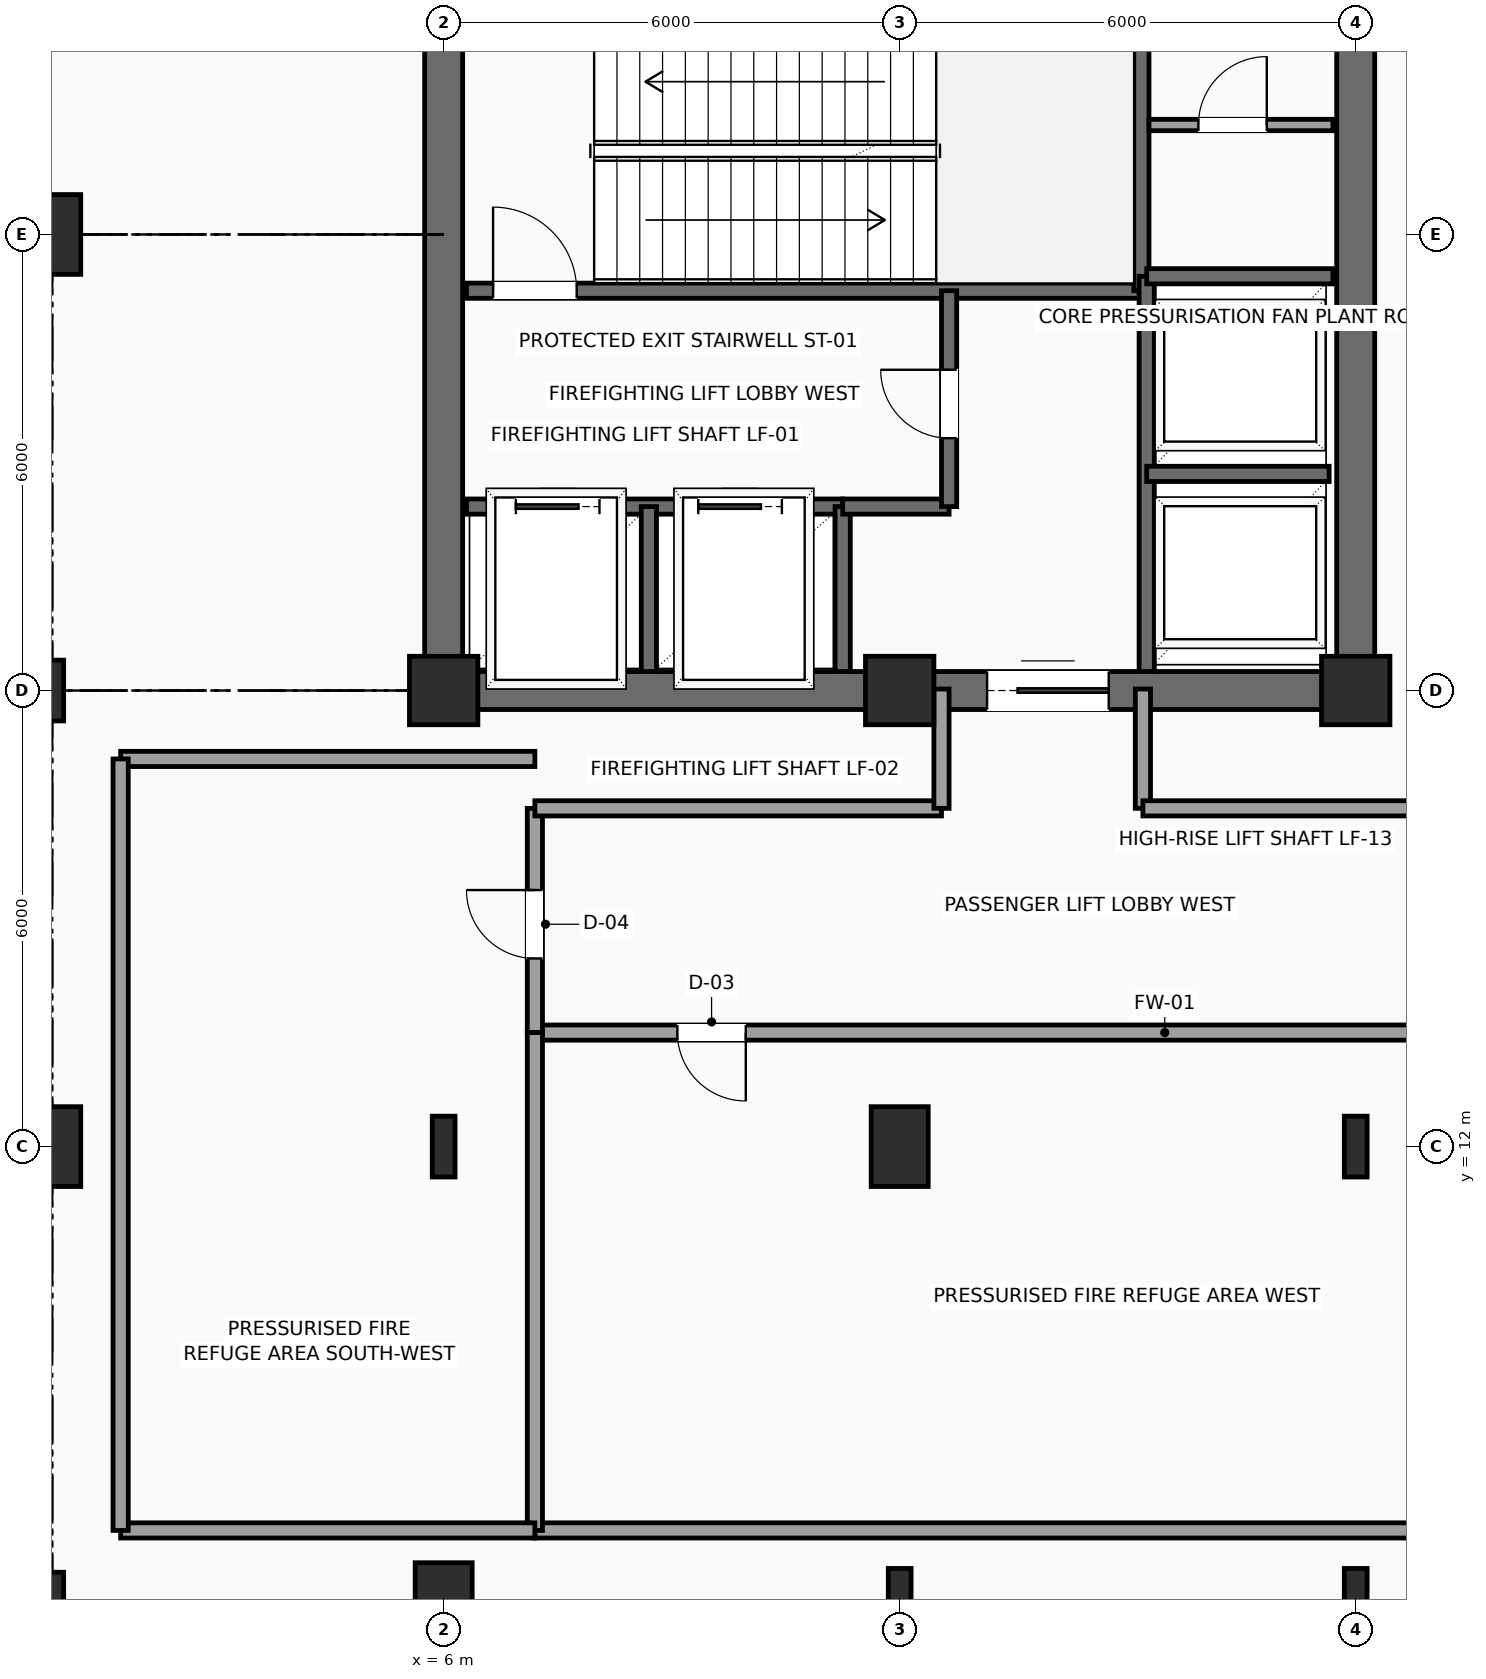
"""IFC4 building model, lengths in metres.
Left out: names, types, materials, properties, quantities, classifications, styles, units other than length and angle.
Written with IfcOpenShell. Run it as: python <this file> out.ifc"""

import sys

from ifc_helpers import new_model, si_unit, direction, frame, frame_2d, origin, origin_2d, place, context, subcontext, project, spatial, rectangle, i_section, extrude, element, fill, save


model = new_model("IFC4")
c1 = context("Model", 3, precision=1e-05, world=origin(), true_north=direction((0.0, 1.0)))
c2 = subcontext(c1, "Body", "Model", "MODEL_VIEW")
j1 = project(units=[si_unit("LENGTHUNIT", "METRE"), si_unit("PLANEANGLEUNIT", "RADIAN")], contexts=[c1])
p1 = place(None, origin())
s1 = spatial("IfcSite", under=j1, at=p1, CompositionType="ELEMENT")
p2 = place(p1, origin())
s2 = spatial("IfcBuilding", under=s1, at=p2, CompositionType="ELEMENT")
p3 = place(p2, frame((0.0, 0.0, 234.9)))
s3 = spatial("IfcBuildingStorey", under=s2, at=p3, CompositionType="ELEMENT", Elevation=234.9)
for number, where, z_axis, x_axis in (
    (1, (6.0, 18.0, 0.0), (0.0, 0.0, 1.0), (1.0, 0.0, 0.0)),
    (2, (12.0, 18.0, 0.0), (0.0, 0.0, 1.0), (1.0, 0.0, 0.0)),
    (3, (18.0, 18.0, 0.0), (0.0, 0.0, 1.0), (1.0, 0.0, 0.0)),
):
    element("IfcColumn", number, at=place(p3, frame(where, z_axis=z_axis, x_axis=x_axis)), inside=s3, PredefinedType="COLUMN", context=c2, shape_type="SweptSolid", body=[
        extrude(rectangle(XDim=0.9, YDim=0.9, at=origin_2d()), origin(), (0.0, 0.0, 1.0), 4.8),
    ])
p4 = place(p3, frame((0.85, 6.0, 0.0), z_axis=(0.0, 0.0, 1.0), x_axis=(1.0, 0.0, 0.0)))
e4 = element("IfcColumn", 4, at=p4, inside=s3, PredefinedType="COLUMN", context=c2, shape_type="SweptSolid", body=[
    extrude(i_section(OverallWidth=0.3, OverallDepth=0.8, WebThickness=0.018, FlangeThickness=0.033, FilletRadius=0.03, at=origin_2d()), origin(), (0.0, 0.0, 1.0), 4.8),
])
p5 = place(p3, frame((0.85, 12.0, 0.0), z_axis=(0.0, 0.0, 1.0), x_axis=(1.0, 0.0, 0.0)))
e5 = element("IfcColumn", 5, at=p5, inside=s3, PredefinedType="COLUMN", context=c2, shape_type="SweptSolid", body=[
    extrude(rectangle(XDim=0.75, YDim=1.05, at=origin_2d()), origin(), (0.0, 0.0, 1.0), 4.8),
])
p6 = place(p3, frame((0.85, 18.0, 0.0), z_axis=(0.0, 0.0, 1.0), x_axis=(1.0, 0.0, 0.0)))
e6 = element("IfcColumn", 6, at=p6, inside=s3, PredefinedType="COLUMN", context=c2, shape_type="SweptSolid", body=[
    extrude(i_section(OverallWidth=0.3, OverallDepth=0.8, WebThickness=0.018, FlangeThickness=0.033, FilletRadius=0.03, at=origin_2d()), origin(), (0.0, 0.0, 1.0), 4.8),
])
for number, where, z_axis, x_axis in (
    (7, (0.85, 24.0, 0.0), (0.0, 0.0, 1.0), (1.0, 0.0, 0.0)),
    (8, (6.0, 6.0, 0.0), (0.0, 0.0, 1.0), (1.0, 0.0, 0.0)),
):
    element("IfcColumn", number, at=place(p3, frame(where, z_axis=z_axis, x_axis=x_axis)), inside=s3, PredefinedType="COLUMN", context=c2, shape_type="SweptSolid", body=[
        extrude(rectangle(XDim=0.75, YDim=1.05, at=origin_2d()), origin(), (0.0, 0.0, 1.0), 4.8),
    ])
p7 = place(p3, frame((6.0, 12.0, 0.0), z_axis=(0.0, 0.0, 1.0), x_axis=(1.0, 0.0, 0.0)))
e9 = element("IfcColumn", 9, at=p7, inside=s3, PredefinedType="COLUMN", context=c2, shape_type="SweptSolid", body=[
    extrude(i_section(OverallWidth=0.3, OverallDepth=0.8, WebThickness=0.018, FlangeThickness=0.033, FilletRadius=0.03, at=origin_2d()), origin(), (0.0, 0.0, 1.0), 4.8),
])
p8 = place(p3, frame((12.0, 6.0, 0.0), z_axis=(0.0, 0.0, 1.0), x_axis=(1.0, 0.0, 0.0)))
e10 = element("IfcColumn", 10, at=p8, inside=s3, PredefinedType="COLUMN", context=c2, shape_type="SweptSolid", body=[
    extrude(i_section(OverallWidth=0.3, OverallDepth=0.9, WebThickness=0.019, FlangeThickness=0.035, FilletRadius=0.03, at=origin_2d()), origin(), (0.0, 0.0, 1.0), 4.8),
])
p9 = place(p3, frame((12.0, 12.0, 0.0), z_axis=(0.0, 0.0, 1.0), x_axis=(1.0, 0.0, 0.0)))
e11 = element("IfcColumn", 11, at=p9, inside=s3, PredefinedType="COLUMN", context=c2, shape_type="SweptSolid", body=[
    extrude(rectangle(XDim=0.75, YDim=1.05, at=origin_2d()), origin(), (0.0, 0.0, 1.0), 4.8),
])
p10 = place(p3, frame((18.0, 6.0, 0.0), z_axis=(0.0, 0.0, 1.0), x_axis=(1.0, 0.0, 0.0)))
e12 = element("IfcColumn", 12, at=p10, inside=s3, PredefinedType="COLUMN", context=c2, shape_type="SweptSolid", body=[
    extrude(i_section(OverallWidth=0.3, OverallDepth=0.9, WebThickness=0.019, FlangeThickness=0.035, FilletRadius=0.03, at=origin_2d()), origin(), (0.0, 0.0, 1.0), 4.8),
])
p11 = place(p3, frame((18.0, 12.0, 0.0), z_axis=(0.0, 0.0, 1.0), x_axis=(1.0, 0.0, 0.0)))
e13 = element("IfcColumn", 13, at=p11, inside=s3, PredefinedType="COLUMN", context=c2, shape_type="SweptSolid", body=[
    extrude(i_section(OverallWidth=0.3, OverallDepth=0.8, WebThickness=0.018, FlangeThickness=0.033, FilletRadius=0.03, at=origin_2d()), origin(), (0.0, 0.0, 1.0), 4.8),
])
p12 = place(p3, frame((6.0, 18.0, 0.0), z_axis=(0.0, 0.0, 1.0), x_axis=(1.0, 0.0, 0.0)))
e14 = element("IfcWall", 14, at=p12, inside=s3, PredefinedType="SHEAR", context=c2, shape_type="SweptSolid", body=[
    extrude(rectangle(XDim=12.0, YDim=0.5, at=frame_2d((6.0, 0.0))), origin(), (0.0, 0.0, 1.0), 4.6),
])
p13 = place(p12, frame((7.15, 0.0, 0.0)))
e15 = element("IfcOpeningElement", 15, at=p13, cuts=e14, PredefinedType="OPENING", context=c2, shape_type="SweptSolid", body=[
    extrude(rectangle(XDim=1.6, YDim=2.3, at=frame_2d((0.8, 1.15))), frame((0.0, 0.26, 0.0), z_axis=(0.0, -1.0, 0.0), x_axis=(1.0, 0.0, 0.0)), (0.0, 0.0, 1.0), 0.52),
])
for number, where, z_axis, x_axis in (
    (16, (6.0, 18.0, 0.0), (0.0, 0.0, 1.0), (0.0, 1.0, 0.0)),
    (17, (18.0, 18.0, 0.0), (0.0, 0.0, 1.0), (0.0, 1.0, 0.0)),
):
    element("IfcWall", number, at=place(p3, frame(where, z_axis=z_axis, x_axis=x_axis)), inside=s3, PredefinedType="SHEAR", context=c2, shape_type="SweptSolid", body=[
        extrude(rectangle(XDim=9.6, YDim=0.5, at=frame_2d((4.8, 0.0))), origin(), (0.0, 0.0, 1.0), 4.6),
    ])
p14 = place(p3, frame((6.3, 23.26, 0.0), z_axis=(0.0, 0.0, 1.0), x_axis=(1.0, 0.0, 0.0)))
e18 = element("IfcWall", 18, at=p14, inside=s3, PredefinedType="SHEAR", context=c2, shape_type="SweptSolid", body=[
    extrude(rectangle(XDim=8.88, YDim=0.2, at=frame_2d((4.44, 0.0))), origin(), (0.0, 0.0, 1.0), 4.6),
])
p15 = place(p14, frame((0.35, 0.0, 0.0)))
e19 = element("IfcOpeningElement", 19, at=p15, cuts=e18, PredefinedType="OPENING", context=c2, shape_type="SweptSolid", body=[
    extrude(rectangle(XDim=1.1, YDim=2.2, at=frame_2d((0.55, 1.1))), frame((0.0, 0.11, 0.0), z_axis=(0.0, -1.0, 0.0), x_axis=(1.0, 0.0, 0.0)), (0.0, 0.0, 1.0), 0.22),
])
p16 = place(p3, frame((15.18, 23.26, 0.0), z_axis=(0.0, 0.0, 1.0), x_axis=(0.0, 1.0, 0.0)))
e20 = element("IfcWall", 20, at=p16, inside=s3, PredefinedType="SHEAR", context=c2, shape_type="SweptSolid", body=[
    extrude(rectangle(XDim=4.04, YDim=0.2, at=frame_2d((2.02, 0.0))), origin(), (0.0, 0.0, 1.0), 4.6),
])
p17 = place(p3, frame((6.3, 20.42, 0.0), z_axis=(0.0, 0.0, 1.0), x_axis=(1.0, 0.0, 0.0)))
e21 = element("IfcWall", 21, at=p17, inside=s3, PredefinedType="SHEAR", context=c2, shape_type="SweptSolid", body=[
    extrude(rectangle(XDim=4.95, YDim=0.2, at=frame_2d((2.475, 0.0))), origin(), (0.0, 0.0, 1.0), 4.6),
])
p18 = place(p17, frame((0.65, 0.0, 0.0)))
e22 = element("IfcOpeningElement", 22, at=p18, cuts=e21, PredefinedType="OPENING", context=c2, shape_type="SweptSolid", body=[
    extrude(rectangle(XDim=1.1, YDim=2.2, at=frame_2d((0.55, 1.1))), frame((0.0, 0.11, 0.0), z_axis=(0.0, -1.0, 0.0), x_axis=(1.0, 0.0, 0.0)), (0.0, 0.0, 1.0), 0.22),
])
p19 = place(p17, frame((3.05, 0.0, 0.0)))
e23 = element("IfcOpeningElement", 23, at=p19, cuts=e21, PredefinedType="OPENING", context=c2, shape_type="SweptSolid", body=[
    extrude(rectangle(XDim=1.1, YDim=2.2, at=frame_2d((0.55, 1.1))), frame((0.0, 0.11, 0.0), z_axis=(0.0, -1.0, 0.0), x_axis=(1.0, 0.0, 0.0)), (0.0, 0.0, 1.0), 0.22),
])
for number, where, z_axis, x_axis in (
    (24, (8.7, 18.25, 0.0), (0.0, 0.0, 1.0), (0.0, 1.0, 0.0)),
    (25, (11.25, 18.25, 0.0), (0.0, 0.0, 1.0), (0.0, 1.0, 0.0)),
):
    element("IfcWall", number, at=place(p3, frame(where, z_axis=z_axis, x_axis=x_axis)), inside=s3, PredefinedType="SHEAR", context=c2, shape_type="SweptSolid", body=[
        extrude(rectangle(XDim=2.17, YDim=0.2, at=frame_2d((1.085, 0.0))), origin(), (0.0, 0.0, 1.0), 4.6),
    ])
p20 = place(p3, frame((11.25, 20.42, 0.0), z_axis=(0.0, 0.0, 1.0), x_axis=(1.0, 0.0, 0.0)))
e26 = element("IfcWall", 26, at=p20, inside=s3, PredefinedType="SHEAR", context=c2, shape_type="SweptSolid", body=[
    extrude(rectangle(XDim=1.4, YDim=0.2, at=frame_2d((0.7, 0.0))), origin(), (0.0, 0.0, 1.0), 4.6),
])
p21 = place(p3, frame((12.65, 20.42, 0.0), z_axis=(0.0, 0.0, 1.0), x_axis=(0.0, 1.0, 0.0)))
e27 = element("IfcWall", 27, at=p21, inside=s3, PredefinedType="SHEAR", context=c2, shape_type="SweptSolid", body=[
    extrude(rectangle(XDim=2.84, YDim=0.2, at=frame_2d((1.42, 0.0))), origin(), (0.0, 0.0, 1.0), 4.6),
])
p22 = place(p21, frame((0.9, 0.0, 0.0)))
e28 = element("IfcOpeningElement", 28, at=p22, cuts=e27, PredefinedType="OPENING", context=c2, shape_type="SweptSolid", body=[
    extrude(rectangle(XDim=0.9, YDim=2.15, at=frame_2d((0.45, 1.075))), frame((0.0, 0.11, 0.0), z_axis=(0.0, -1.0, 0.0), x_axis=(1.0, 0.0, 0.0)), (0.0, 0.0, 1.0), 0.22),
])
p23 = place(p3, frame((15.25, 18.25, 0.0), z_axis=(0.0, 0.0, 1.0), x_axis=(0.0, 1.0, 0.0)))
e29 = element("IfcWall", 29, at=p23, inside=s3, PredefinedType="SHEAR", context=c2, shape_type="SweptSolid", body=[
    extrude(rectangle(XDim=5.2, YDim=0.2, at=frame_2d((2.6, 0.0))), origin(), (0.0, 0.0, 1.0), 4.6),
])
p24 = place(p3, frame((15.25, 20.85, 0.0), z_axis=(0.0, 0.0, 1.0), x_axis=(1.0, 0.0, 0.0)))
e30 = element("IfcWall", 30, at=p24, inside=s3, PredefinedType="SHEAR", context=c2, shape_type="SweptSolid", body=[
    extrude(rectangle(XDim=2.4, YDim=0.2, at=frame_2d((1.2, 0.0))), origin(), (0.0, 0.0, 1.0), 4.6),
])
p25 = place(p3, frame((15.25, 23.45, 0.0), z_axis=(0.0, 0.0, 1.0), x_axis=(1.0, 0.0, 0.0)))
e31 = element("IfcWall", 31, at=p25, inside=s3, PredefinedType="SHEAR", context=c2, shape_type="SweptSolid", body=[
    extrude(rectangle(XDim=2.45, YDim=0.2, at=frame_2d((1.225, 0.0))), origin(), (0.0, 0.0, 1.0), 4.6),
])
p26 = place(p3, frame((15.28, 25.44, 0.0), z_axis=(0.0, 0.0, 1.0), x_axis=(1.0, 0.0, 0.0)))
e32 = element("IfcWall", 32, at=p26, inside=s3, PredefinedType="PARTITIONING", context=c2, shape_type="SweptSolid", body=[
    extrude(rectangle(XDim=2.42, YDim=0.15, at=frame_2d((1.21, 0.0))), origin(), (0.0, 0.0, 1.0), 4.6),
])
p27 = place(p26, frame((0.65, 0.0, 0.0)))
e33 = element("IfcOpeningElement", 33, at=p27, cuts=e32, PredefinedType="OPENING", context=c2, shape_type="SweptSolid", body=[
    extrude(rectangle(XDim=0.9, YDim=2.15, at=frame_2d((0.45, 1.075))), frame((0.0, 0.085, 0.0), z_axis=(0.0, -1.0, 0.0), x_axis=(1.0, 0.0, 0.0)), (0.0, 0.0, 1.0), 0.17),
])
p28 = place(p3, frame((20.75, 13.5, 0.0), z_axis=(0.0, 0.0, 1.0), x_axis=(-1.0, 0.0, 0.0)))
e34 = element("IfcWall", 34, at=p28, inside=s3, PredefinedType="SOLIDWALL", context=c2, shape_type="SweptSolid", body=[
    extrude(rectangle(XDim=13.55, YDim=0.2, at=frame_2d((6.775, 0.0))), origin(), (0.0, 0.0, 1.0), 4.6),
])
p29 = place(p28, frame((10.775, 0.0, 0.0)))
e35 = element("IfcOpeningElement", 35, at=p29, cuts=e34, PredefinedType="OPENING", context=c2, shape_type="SweptSolid", body=[
    extrude(rectangle(XDim=0.9, YDim=2.15, at=frame_2d((0.45, 1.075))), frame((0.0, 0.11, 0.0), z_axis=(0.0, -1.0, 0.0), x_axis=(1.0, 0.0, 0.0)), (0.0, 0.0, 1.0), 0.22),
])
p30 = place(p3, frame((7.2, 13.5, 0.0), z_axis=(0.0, 0.0, 1.0), x_axis=(0.0, 1.0, 0.0)))
e36 = element("IfcWall", 36, at=p30, inside=s3, PredefinedType="SOLIDWALL", context=c2, shape_type="SweptSolid", body=[
    extrude(rectangle(XDim=2.95, YDim=0.2, at=frame_2d((1.475, 0.0))), origin(), (0.0, 0.0, 1.0), 4.6),
])
p31 = place(p30, frame((0.975, 0.0, 0.0)))
e37 = element("IfcOpeningElement", 37, at=p31, cuts=e36, PredefinedType="OPENING", context=c2, shape_type="SweptSolid", body=[
    extrude(rectangle(XDim=0.9, YDim=2.15, at=frame_2d((0.45, 1.075))), frame((0.0, 0.11, 0.0), z_axis=(0.0, -1.0, 0.0), x_axis=(1.0, 0.0, 0.0)), (0.0, 0.0, 1.0), 0.22),
])
p32 = place(p3, frame((7.2, 16.45, 0.0), z_axis=(0.0, 0.0, 1.0), x_axis=(1.0, 0.0, 0.0)))
e38 = element("IfcWall", 38, at=p32, inside=s3, PredefinedType="SOLIDWALL", context=c2, shape_type="SweptSolid", body=[
    extrude(rectangle(XDim=5.35, YDim=0.2, at=frame_2d((2.675, 0.0))), origin(), (0.0, 0.0, 1.0), 4.6),
])
for number, where, z_axis, x_axis in (
    (39, (12.55, 16.45, 0.0), (0.0, 0.0, 1.0), (0.0, 1.0, 0.0)),
    (40, (15.2, 18.02, 0.0), (0.0, 0.0, 1.0), (0.0, -1.0, 0.0)),
):
    element("IfcWall", number, at=place(p3, frame(where, z_axis=z_axis, x_axis=x_axis)), inside=s3, PredefinedType="SOLIDWALL", context=c2, shape_type="SweptSolid", body=[
        extrude(rectangle(XDim=1.57, YDim=0.2, at=frame_2d((0.785, 0.0))), origin(), (0.0, 0.0, 1.0), 4.6),
    ])
p33 = place(p3, frame((15.2, 16.45, 0.0), z_axis=(0.0, 0.0, 1.0), x_axis=(1.0, 0.0, 0.0)))
e41 = element("IfcWall", 41, at=p33, inside=s3, PredefinedType="SOLIDWALL", context=c2, shape_type="SweptSolid", body=[
    extrude(rectangle(XDim=3.7, YDim=0.2, at=frame_2d((1.85, 0.0))), origin(), (0.0, 0.0, 1.0), 4.6),
])
p34 = place(p3, frame((7.2, 6.95, 0.0), z_axis=(0.0, 0.0, 1.0), x_axis=(1.0, 0.0, 0.0)))
e42 = element("IfcWall", 42, at=p34, inside=s3, PredefinedType="SOLIDWALL", context=c2, shape_type="SweptSolid", body=[
    extrude(rectangle(XDim=13.55, YDim=0.2, at=frame_2d((6.775, 0.0))), origin(), (0.0, 0.0, 1.0), 4.6),
])
p35 = place(p3, frame((7.2, 6.95, 0.0), z_axis=(0.0, 0.0, 1.0), x_axis=(0.0, 1.0, 0.0)))
e43 = element("IfcWall", 43, at=p35, inside=s3, PredefinedType="SOLIDWALL", context=c2, shape_type="SweptSolid", body=[
    extrude(rectangle(XDim=6.55, YDim=0.2, at=frame_2d((3.275, 0.0))), origin(), (0.0, 0.0, 1.0), 4.6),
])
for number, where, z_axis, x_axis in (
    (44, (1.75, 6.95, 0.0), (0.0, 0.0, 1.0), (1.0, 0.0, 0.0)),
    (45, (1.75, 17.1, 0.0), (0.0, 0.0, 1.0), (1.0, 0.0, 0.0)),
):
    element("IfcWall", number, at=place(p3, frame(where, z_axis=z_axis, x_axis=x_axis)), inside=s3, PredefinedType="SOLIDWALL", context=c2, shape_type="SweptSolid", body=[
        extrude(rectangle(XDim=5.45, YDim=0.2, at=frame_2d((2.725, 0.0))), origin(), (0.0, 0.0, 1.0), 4.6),
    ])
p36 = place(p3, frame((1.75, 6.95, 0.0), z_axis=(0.0, 0.0, 1.0), x_axis=(0.0, 1.0, 0.0)))
e46 = element("IfcWall", 46, at=p36, inside=s3, PredefinedType="SOLIDWALL", context=c2, shape_type="SweptSolid", body=[
    extrude(rectangle(XDim=10.15, YDim=0.2, at=frame_2d((5.075, 0.0))), origin(), (0.0, 0.0, 1.0), 4.6),
])
p37 = place(p13, origin())
e47 = element("IfcDoor", 47, at=p37, inside=s3, OperationType="DOUBLE_DOOR_SLIDING", PredefinedType="DOOR", context=c2, shape_type="SweptSolid", body=[
    extrude(rectangle(XDim=1.6, YDim=2.3, at=frame_2d((0.8, 1.15))), frame((0.0, 0.025, 0.0), z_axis=(0.0, -1.0, 0.0), x_axis=(1.0, 0.0, 0.0)), (0.0, 0.0, 1.0), 0.05),
])
fill(e15, e47)
p38 = place(p15, origin())
e48 = element("IfcDoor", 48, at=p38, inside=s3, OperationType="SINGLE_SWING_LEFT", PredefinedType="DOOR", context=c2, shape_type="SweptSolid", body=[
    extrude(rectangle(XDim=1.1, YDim=2.2, at=frame_2d((0.55, 1.1))), frame((0.0, 0.025, 0.0), z_axis=(0.0, -1.0, 0.0), x_axis=(1.0, 0.0, 0.0)), (0.0, 0.0, 1.0), 0.05),
])
fill(e19, e48)
p39 = place(p18, origin())
e49 = element("IfcDoor", 49, at=p39, inside=s3, OperationType="SLIDING_TO_LEFT", PredefinedType="DOOR", context=c2, shape_type="SweptSolid", body=[
    extrude(rectangle(XDim=1.1, YDim=2.2, at=frame_2d((0.55, 1.1))), frame((0.0, 0.025, 0.0), z_axis=(0.0, -1.0, 0.0), x_axis=(1.0, 0.0, 0.0)), (0.0, 0.0, 1.0), 0.05),
])
fill(e22, e49)
p40 = place(p19, origin())
e50 = element("IfcDoor", 50, at=p40, inside=s3, OperationType="SLIDING_TO_LEFT", PredefinedType="DOOR", context=c2, shape_type="SweptSolid", body=[
    extrude(rectangle(XDim=1.1, YDim=2.2, at=frame_2d((0.55, 1.1))), frame((0.0, 0.025, 0.0), z_axis=(0.0, -1.0, 0.0), x_axis=(1.0, 0.0, 0.0)), (0.0, 0.0, 1.0), 0.05),
])
fill(e23, e50)
p41 = place(p22, origin())
e51 = element("IfcDoor", 51, at=p41, inside=s3, OperationType="SINGLE_SWING_RIGHT", PredefinedType="DOOR", context=c2, shape_type="SweptSolid", body=[
    extrude(rectangle(XDim=0.9, YDim=2.15, at=frame_2d((0.45, 1.075))), frame((0.0, 0.025, 0.0), z_axis=(0.0, -1.0, 0.0), x_axis=(1.0, 0.0, 0.0)), (0.0, 0.0, 1.0), 0.05),
])
fill(e28, e51)
p42 = place(p27, origin())
e52 = element("IfcDoor", 52, at=p42, inside=s3, OperationType="SINGLE_SWING_RIGHT", PredefinedType="DOOR", context=c2, shape_type="SweptSolid", body=[
    extrude(rectangle(XDim=0.9, YDim=2.15, at=frame_2d((0.45, 1.075))), frame((0.0, 0.025, 0.0), z_axis=(0.0, -1.0, 0.0), x_axis=(1.0, 0.0, 0.0)), (0.0, 0.0, 1.0), 0.05),
])
fill(e33, e52)
p43 = place(p29, origin())
e53 = element("IfcDoor", 53, at=p43, inside=s3, OperationType="SINGLE_SWING_LEFT", PredefinedType="DOOR", context=c2, shape_type="SweptSolid", body=[
    extrude(rectangle(XDim=0.9, YDim=2.15, at=frame_2d((0.45, 1.075))), frame((0.0, 0.025, 0.0), z_axis=(0.0, -1.0, 0.0), x_axis=(1.0, 0.0, 0.0)), (0.0, 0.0, 1.0), 0.05),
])
fill(e35, e53)
p44 = place(p31, origin())
e54 = element("IfcDoor", 54, at=p44, inside=s3, OperationType="SINGLE_SWING_RIGHT", PredefinedType="DOOR", context=c2, shape_type="SweptSolid", body=[
    extrude(rectangle(XDim=0.9, YDim=2.15, at=frame_2d((0.45, 1.075))), frame((0.0, 0.025, 0.0), z_axis=(0.0, -1.0, 0.0), x_axis=(1.0, 0.0, 0.0)), (0.0, 0.0, 1.0), 0.05),
])
fill(e37, e54)
save(model, sys.argv[1])
